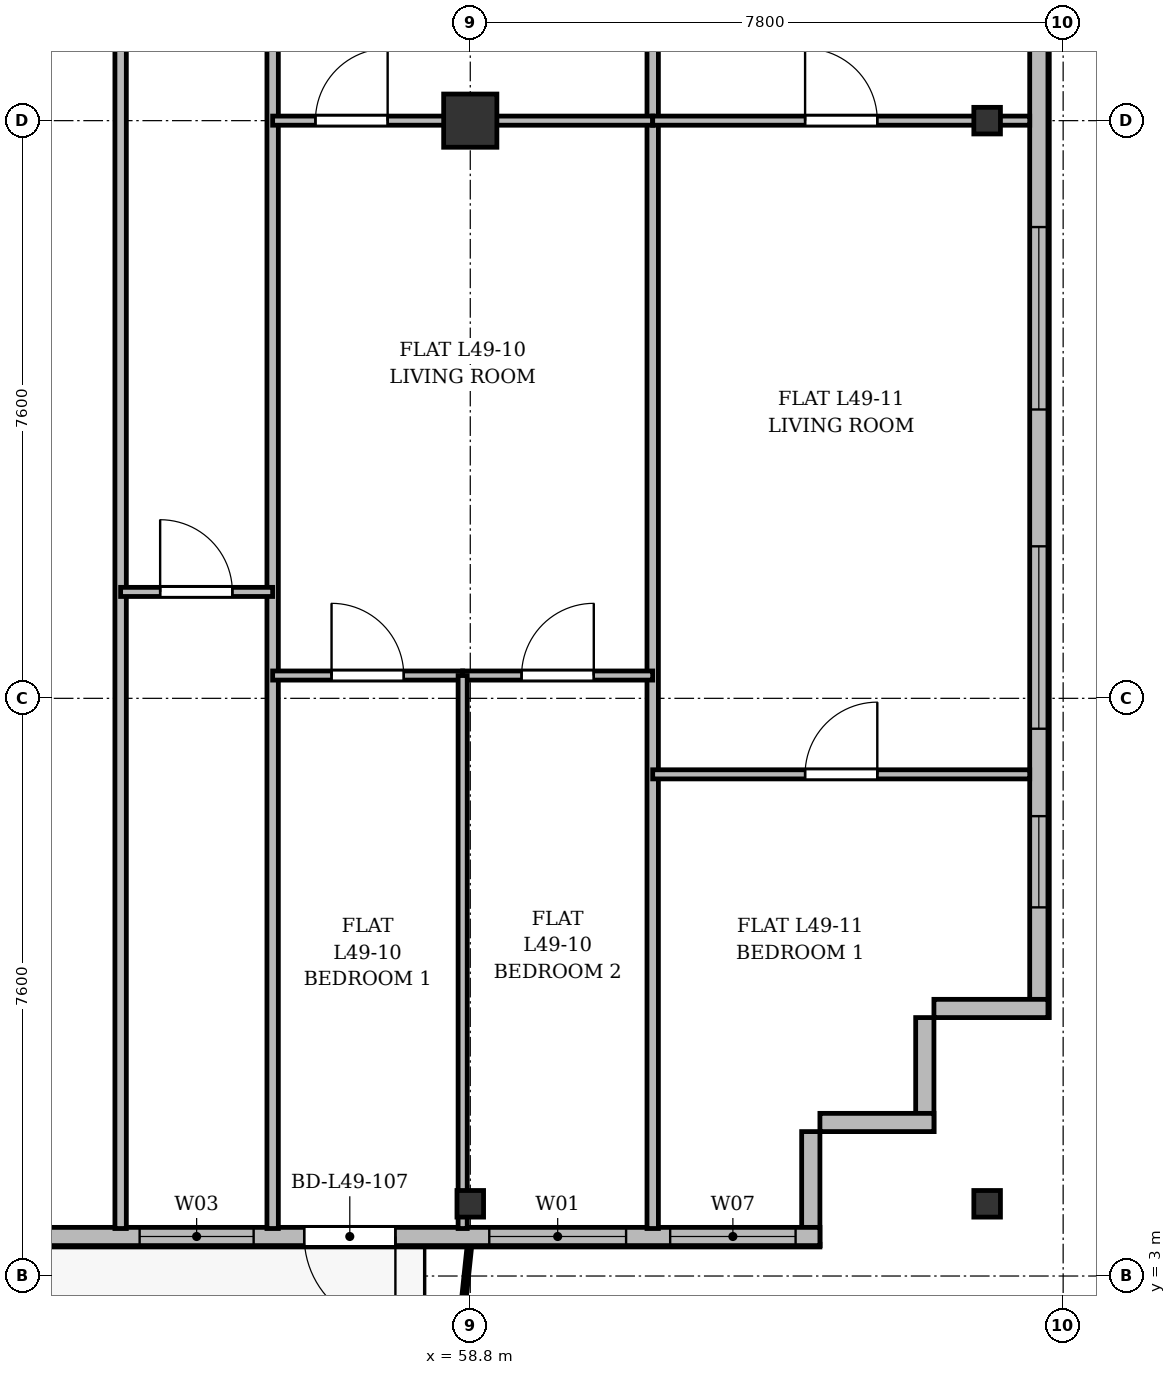
"""IFC4 building model, lengths in metres.
Left out: names, types, materials, properties, quantities, classifications, styles, units other than length and angle.
Written with IfcOpenShell. Run it as: python <this file> out.ifc"""

import sys

from ifc_helpers import new_model, si_unit, direction, frame, frame_2d, origin, origin_2d, place, context, subcontext, project, spatial, rectangle, i_section, extrude, source, transform, mapped, element, fill, save


model = new_model("IFC4")
c1 = context("Model", 3, precision=1e-05, world=origin(), true_north=direction((0.0, 1.0)))
c2 = subcontext(c1, "Body", "Model", "MODEL_VIEW")
j1 = project(units=[si_unit("LENGTHUNIT", "METRE"), si_unit("PLANEANGLEUNIT", "RADIAN")], contexts=[c1])
p1 = place(None, origin())
s1 = spatial("IfcSite", under=j1, at=p1, CompositionType="ELEMENT")
p2 = place(p1, origin())
s2 = spatial("IfcBuilding", under=s1, at=p2, CompositionType="ELEMENT")
p3 = place(p2, frame((0.0, 0.0, 190.5)))
s3 = spatial("IfcBuildingStorey", under=s2, at=p3, CompositionType="ELEMENT", Elevation=190.5)
m1 = source(origin(), c2, "Body", "SweptSolid", [
    extrude(i_section(OverallWidth=0.35, OverallDepth=0.35, WebThickness=0.018, FlangeThickness=0.028, at=origin_2d()), origin(), (0.0, 0.0, 1.0), 3.6),
])
p4 = place(p3, frame((58.8, 3.95, 0.0), z_axis=(0.0, 0.0, 1.0), x_axis=(1.0, 0.0, 0.0)))
e1 = element("IfcColumn", 1, at=p4, inside=s3, PredefinedType="COLUMN", context=c2, shape_type="MappedRepresentation", body=[
    mapped(m1, transform((0.0, 0.0, 0.0), x_axis=(1.0, 0.0, 0.0), y_axis=(0.0, 1.0, 0.0), z_axis=(0.0, 0.0, 1.0), scale=1.0)),
])
m2 = source(origin(), c2, "Body", "SweptSolid", [
    extrude(rectangle(XDim=0.7, YDim=0.7, at=origin_2d()), origin(), (0.0, 0.0, 1.0), 3.6),
])
p5 = place(p3, frame((58.8, 18.2, 0.0), z_axis=(0.0, 0.0, 1.0), x_axis=(1.0, 0.0, 0.0)))
e2 = element("IfcColumn", 2, at=p5, inside=s3, PredefinedType="COLUMN", context=c2, shape_type="MappedRepresentation", body=[
    mapped(m2, transform((0.0, 0.0, 0.0), x_axis=(1.0, 0.0, 0.0), y_axis=(0.0, 1.0, 0.0), z_axis=(0.0, 0.0, 1.0), scale=1.0)),
])
for number, where, z_axis, x_axis in (
    (3, (65.6, 3.95, 0.0), (0.0, 0.0, 1.0), (1.0, 0.0, 0.0)),
    (4, (65.6, 18.2, 0.0), (0.0, 0.0, 1.0), (1.0, 0.0, 0.0)),
):
    element("IfcColumn", number, at=place(p3, frame(where, z_axis=z_axis, x_axis=x_axis)), inside=s3, PredefinedType="COLUMN", context=c2, shape_type="MappedRepresentation", body=[
        mapped(m1, transform((0.0, 0.0, 0.0), x_axis=(1.0, 0.0, 0.0), y_axis=(0.0, 1.0, 0.0), z_axis=(0.0, 0.0, 1.0), scale=1.0)),
    ])
p6 = place(p3, frame((66.28, 45.5, 0.0), z_axis=(0.0, 0.0, 1.0), x_axis=(0.0, -1.0, 0.0)))
e5 = element("IfcWall", 5, at=p6, inside=s3, PredefinedType="SOLIDWALL", context=c2, shape_type="SweptSolid", body=[
    extrude(rectangle(XDim=39.1, YDim=0.24, at=frame_2d((19.55, 0.0))), origin(), (0.0, 0.0, 1.0), 3.36),
])
p7 = place(p6, frame((36.45, 0.0, 0.92)))
e6 = element("IfcOpeningElement", 6, at=p7, cuts=e5, PredefinedType="OPENING", context=c2, shape_type="SweptSolid", body=[
    extrude(rectangle(XDim=1.2, YDim=1.65, at=frame_2d((0.6, 0.825))), frame((0.0, 0.13, 0.0), z_axis=(0.0, -1.0, 0.0), x_axis=(1.0, 0.0, 0.0)), (0.0, 0.0, 1.0), 0.26),
])
p8 = place(p6, frame((32.9, 0.0, 0.92)))
e7 = element("IfcOpeningElement", 7, at=p8, cuts=e5, PredefinedType="OPENING", context=c2, shape_type="SweptSolid", body=[
    extrude(rectangle(XDim=2.4, YDim=2.1, at=frame_2d((1.2, 1.05))), frame((0.0, 0.13, 0.0), z_axis=(0.0, -1.0, 0.0), x_axis=(1.0, 0.0, 0.0)), (0.0, 0.0, 1.0), 0.26),
])
p9 = place(p6, frame((28.7, 0.0, 0.92)))
e8 = element("IfcOpeningElement", 8, at=p9, cuts=e5, PredefinedType="OPENING", context=c2, shape_type="SweptSolid", body=[
    extrude(rectangle(XDim=2.4, YDim=2.1, at=frame_2d((1.2, 1.05))), frame((0.0, 0.13, 0.0), z_axis=(0.0, -1.0, 0.0), x_axis=(1.0, 0.0, 0.0)), (0.0, 0.0, 1.0), 0.26),
])
p10 = place(p6, frame((21.5, 0.0, 0.92)))
e9 = element("IfcOpeningElement", 9, at=p10, cuts=e5, PredefinedType="OPENING", context=c2, shape_type="SweptSolid", body=[
    extrude(rectangle(XDim=2.4, YDim=2.1, at=frame_2d((1.2, 1.05))), frame((0.0, 0.13, 0.0), z_axis=(0.0, -1.0, 0.0), x_axis=(1.0, 0.0, 0.0)), (0.0, 0.0, 1.0), 0.26),
])
p11 = place(p6, frame((7.5, 0.0, 0.92)))
e10 = element("IfcOpeningElement", 10, at=p11, cuts=e5, PredefinedType="OPENING", context=c2, shape_type="SweptSolid", body=[
    extrude(rectangle(XDim=2.4, YDim=2.1, at=frame_2d((1.2, 1.05))), frame((0.0, 0.13, 0.0), z_axis=(0.0, -1.0, 0.0), x_axis=(1.0, 0.0, 0.0)), (0.0, 0.0, 1.0), 0.26),
])
p12 = place(p6, frame((4.5, 0.0, 0.92)))
e11 = element("IfcOpeningElement", 11, at=p12, cuts=e5, PredefinedType="OPENING", context=c2, shape_type="SweptSolid", body=[
    extrude(rectangle(XDim=1.2, YDim=1.65, at=frame_2d((0.6, 0.825))), frame((0.0, 0.13, 0.0), z_axis=(0.0, -1.0, 0.0), x_axis=(1.0, 0.0, 0.0)), (0.0, 0.0, 1.0), 0.26),
])
p13 = place(p6, frame((1.15, 0.0, 0.92)))
e12 = element("IfcOpeningElement", 12, at=p13, cuts=e5, PredefinedType="OPENING", context=c2, shape_type="SweptSolid", body=[
    extrude(rectangle(XDim=1.2, YDim=1.65, at=frame_2d((0.6, 0.825))), frame((0.0, 0.13, 0.0), z_axis=(0.0, -1.0, 0.0), x_axis=(1.0, 0.0, 0.0)), (0.0, 0.0, 1.0), 0.26),
])
p14 = place(p3, frame((66.4, 6.52, 0.0), z_axis=(0.0, 0.0, 1.0), x_axis=(-1.0, 0.0, 0.0)))
e13 = element("IfcWall", 13, at=p14, inside=s3, PredefinedType="SOLIDWALL", context=c2, shape_type="SweptSolid", body=[
    extrude(rectangle(XDim=1.5, YDim=0.24, at=frame_2d((0.75, 0.0))), origin(), (0.0, 0.0, 1.0), 2.86),
])
for number, where, z_axis, x_axis in (
    (14, (64.78, 6.4, 0.0), (0.0, 0.0, 1.0), (0.0, -1.0, 0.0)),
    (15, (64.9, 5.02, 0.0), (0.0, 0.0, 1.0), (-1.0, 0.0, 0.0)),
):
    element("IfcWall", number, at=place(p3, frame(where, z_axis=z_axis, x_axis=x_axis)), inside=s3, PredefinedType="SOLIDWALL", context=c2, shape_type="SweptSolid", body=[
        extrude(rectangle(XDim=1.5, YDim=0.24, at=frame_2d((0.75, 0.0))), origin(), (0.0, 0.0, 1.0), 3.36),
    ])
p15 = place(p3, frame((63.28, 4.9, 0.0), z_axis=(0.0, 0.0, 1.0), x_axis=(0.0, -1.0, 0.0)))
e16 = element("IfcWall", 16, at=p15, inside=s3, PredefinedType="SOLIDWALL", context=c2, shape_type="SweptSolid", body=[
    extrude(rectangle(XDim=1.5, YDim=0.24, at=frame_2d((0.75, 0.0))), origin(), (0.0, 0.0, 1.0), 2.91),
])
p16 = place(p3, frame((63.4, 3.52, 0.0), z_axis=(0.0, 0.0, 1.0), x_axis=(-1.0, 0.0, 0.0)))
e17 = element("IfcWall", 17, at=p16, inside=s3, PredefinedType="SOLIDWALL", context=c2, shape_type="SweptSolid", body=[
    extrude(rectangle(XDim=19.6, YDim=0.24, at=frame_2d((9.8, 0.0))), origin(), (0.0, 0.0, 1.0), 3.36),
])
p17 = place(p16, frame((0.32, 0.0, 0.9)))
e18 = element("IfcOpeningElement", 18, at=p17, cuts=e17, PredefinedType="OPENING", context=c2, shape_type="SweptSolid", body=[
    extrude(rectangle(XDim=1.65, YDim=1.85, at=frame_2d((0.825, 0.925))), frame((0.0, 0.13, 0.0), z_axis=(0.0, -1.0, 0.0), x_axis=(1.0, 0.0, 0.0)), (0.0, 0.0, 1.0), 0.26),
])
p18 = place(p16, frame((2.55, 0.0, 0.9)))
e19 = element("IfcOpeningElement", 19, at=p18, cuts=e17, PredefinedType="OPENING", context=c2, shape_type="SweptSolid", body=[
    extrude(rectangle(XDim=1.8, YDim=1.8, at=frame_2d((0.9, 0.9))), frame((0.0, 0.13, 0.0), z_axis=(0.0, -1.0, 0.0), x_axis=(1.0, 0.0, 0.0)), (0.0, 0.0, 1.0), 0.26),
])
p19 = place(p16, frame((5.585, 0.0, 0.0)))
e20 = element("IfcOpeningElement", 20, at=p19, cuts=e17, PredefinedType="OPENING", context=c2, shape_type="SweptSolid", body=[
    extrude(rectangle(XDim=1.2, YDim=2.2, at=frame_2d((0.6, 1.1))), frame((0.0, 0.13, 0.0), z_axis=(0.0, -1.0, 0.0), x_axis=(1.0, 0.0, 0.0)), (0.0, 0.0, 1.0), 0.26),
])
p20 = place(p16, frame((7.45, 0.0, 0.9)))
e21 = element("IfcOpeningElement", 21, at=p20, cuts=e17, PredefinedType="OPENING", context=c2, shape_type="SweptSolid", body=[
    extrude(rectangle(XDim=1.5, YDim=1.75, at=frame_2d((0.75, 0.875))), frame((0.0, 0.13, 0.0), z_axis=(0.0, -1.0, 0.0), x_axis=(1.0, 0.0, 0.0)), (0.0, 0.0, 1.0), 0.26),
])
p21 = place(p16, frame((10.7, 0.0, 0.9)))
e22 = element("IfcOpeningElement", 22, at=p21, cuts=e17, PredefinedType="OPENING", context=c2, shape_type="SweptSolid", body=[
    extrude(rectangle(XDim=2.0, YDim=1.95, at=frame_2d((1.0, 0.975))), frame((0.0, 0.13, 0.0), z_axis=(0.0, -1.0, 0.0), x_axis=(1.0, 0.0, 0.0)), (0.0, 0.0, 1.0), 0.26),
])
p22 = place(p16, frame((16.03, 0.0, 0.9)))
e23 = element("IfcOpeningElement", 23, at=p22, cuts=e17, PredefinedType="OPENING", context=c2, shape_type="SweptSolid", body=[
    extrude(rectangle(XDim=1.65, YDim=1.85, at=frame_2d((0.825, 0.925))), frame((0.0, 0.13, 0.0), z_axis=(0.0, -1.0, 0.0), x_axis=(1.0, 0.0, 0.0)), (0.0, 0.0, 1.0), 0.26),
])
for number, where, z_axis, x_axis in (
    (24, (61.2, 3.625, 0.0), (0.0, 0.0, 1.0), (0.0, 1.0, 0.0)),
    (25, (54.2, 3.625, 0.0), (0.0, 0.0, 1.0), (0.0, 1.0, 0.0)),
    (26, (56.2, 3.625, 0.0), (0.0, 0.0, 1.0), (0.0, 1.0, 0.0)),
):
    element("IfcWall", number, at=place(p3, frame(where, z_axis=z_axis, x_axis=x_axis)), inside=s3, PredefinedType="PARTITIONING", context=c2, shape_type="SweptSolid", body=[
        extrude(rectangle(XDim=27.175, YDim=0.15, at=frame_2d((13.587, 0.0))), origin(), (0.0, 0.0, 1.0), 2.91),
    ])
p23 = place(p3, frame((54.2, 12.0, 0.0), z_axis=(0.0, 0.0, 1.0), x_axis=(1.0, 0.0, 0.0)))
e27 = element("IfcWall", 27, at=p23, inside=s3, PredefinedType="PARTITIONING", context=c2, shape_type="SweptSolid", body=[
    extrude(rectangle(XDim=2.0, YDim=0.12, at=frame_2d((1.0, 0.0))), origin(), (0.0, 0.0, 1.0), 3.36),
])
p24 = place(p23, frame((0.52, 0.0, 0.0)))
e28 = element("IfcOpeningElement", 28, at=p24, cuts=e27, PredefinedType="OPENING", context=c2, shape_type="SweptSolid", body=[
    extrude(rectangle(XDim=0.95, YDim=2.15, at=frame_2d((0.475, 1.075))), frame((0.0, 0.07, 0.0), z_axis=(0.0, -1.0, 0.0), x_axis=(1.0, 0.0, 0.0)), (0.0, 0.0, 1.0), 0.14),
])
p25 = place(p3, frame((56.2, 18.2, 0.0), z_axis=(0.0, 0.0, 1.0), x_axis=(1.0, 0.0, 0.0)))
e29 = element("IfcWall", 29, at=p25, inside=s3, PredefinedType="PARTITIONING", context=c2, shape_type="SweptSolid", body=[
    extrude(rectangle(XDim=5.0, YDim=0.12, at=frame_2d((2.5, 0.0))), origin(), (0.0, 0.0, 1.0), 2.91),
])
p26 = place(p25, frame((0.563, 0.0, 0.0)))
e30 = element("IfcOpeningElement", 30, at=p26, cuts=e29, PredefinedType="OPENING", context=c2, shape_type="SweptSolid", body=[
    extrude(rectangle(XDim=0.95, YDim=2.15, at=frame_2d((0.475, 1.075))), frame((0.0, 0.07, 0.0), z_axis=(0.0, -1.0, 0.0), x_axis=(1.0, 0.0, 0.0)), (0.0, 0.0, 1.0), 0.14),
])
p27 = place(p3, frame((56.2, 10.9, 0.0), z_axis=(0.0, 0.0, 1.0), x_axis=(1.0, 0.0, 0.0)))
e31 = element("IfcWall", 31, at=p27, inside=s3, PredefinedType="PARTITIONING", context=c2, shape_type="SweptSolid", body=[
    extrude(rectangle(XDim=2.5, YDim=0.12, at=frame_2d((1.25, 0.0))), origin(), (0.0, 0.0, 1.0), 3.36),
])
p28 = place(p27, frame((0.775, 0.0, 0.0)))
e32 = element("IfcOpeningElement", 32, at=p28, cuts=e31, PredefinedType="OPENING", context=c2, shape_type="SweptSolid", body=[
    extrude(rectangle(XDim=0.95, YDim=2.15, at=frame_2d((0.475, 1.075))), frame((0.0, 0.07, 0.0), z_axis=(0.0, -1.0, 0.0), x_axis=(1.0, 0.0, 0.0)), (0.0, 0.0, 1.0), 0.14),
])
p29 = place(p3, frame((58.7, 10.9, 0.0), z_axis=(0.0, 0.0, 1.0), x_axis=(1.0, 0.0, 0.0)))
e33 = element("IfcWall", 33, at=p29, inside=s3, PredefinedType="PARTITIONING", context=c2, shape_type="SweptSolid", body=[
    extrude(rectangle(XDim=2.5, YDim=0.12, at=frame_2d((1.25, 0.0))), origin(), (0.0, 0.0, 1.0), 2.86),
])
p30 = place(p29, frame((0.775, 0.0, 0.0)))
e34 = element("IfcOpeningElement", 34, at=p30, cuts=e33, PredefinedType="OPENING", context=c2, shape_type="SweptSolid", body=[
    extrude(rectangle(XDim=0.95, YDim=2.15, at=frame_2d((0.475, 1.075))), frame((0.0, 0.07, 0.0), z_axis=(0.0, -1.0, 0.0), x_axis=(1.0, 0.0, 0.0)), (0.0, 0.0, 1.0), 0.14),
])
p31 = place(p3, frame((58.7, 3.625, 0.0), z_axis=(0.0, 0.0, 1.0), x_axis=(0.0, 1.0, 0.0)))
e35 = element("IfcWall", 35, at=p31, inside=s3, PredefinedType="PARTITIONING", context=c2, shape_type="SweptSolid", body=[
    extrude(rectangle(XDim=7.275, YDim=0.12, at=frame_2d((3.637, 0.0))), origin(), (0.0, 0.0, 1.0), 2.86),
])
p32 = place(p3, frame((61.2, 18.2, 0.0), z_axis=(0.0, 0.0, 1.0), x_axis=(1.0, 0.0, 0.0)))
e36 = element("IfcWall", 36, at=p32, inside=s3, PredefinedType="PARTITIONING", context=c2, shape_type="SweptSolid", body=[
    extrude(rectangle(XDim=4.96, YDim=0.12, at=frame_2d((2.48, 0.0))), origin(), (0.0, 0.0, 1.0), 2.91),
])
p33 = place(p32, frame((2.005, 0.0, 0.0)))
e37 = element("IfcOpeningElement", 37, at=p33, cuts=e36, PredefinedType="OPENING", context=c2, shape_type="SweptSolid", body=[
    extrude(rectangle(XDim=0.95, YDim=2.15, at=frame_2d((0.475, 1.075))), frame((0.0, 0.07, 0.0), z_axis=(0.0, -1.0, 0.0), x_axis=(1.0, 0.0, 0.0)), (0.0, 0.0, 1.0), 0.14),
])
p34 = place(p3, frame((61.2, 9.6, 0.0), z_axis=(0.0, 0.0, 1.0), x_axis=(1.0, 0.0, 0.0)))
e38 = element("IfcWall", 38, at=p34, inside=s3, PredefinedType="PARTITIONING", context=c2, shape_type="SweptSolid", body=[
    extrude(rectangle(XDim=4.96, YDim=0.12, at=frame_2d((2.48, 0.0))), origin(), (0.0, 0.0, 1.0), 2.86),
])
p35 = place(p34, frame((2.005, 0.0, 0.0)))
e39 = element("IfcOpeningElement", 39, at=p35, cuts=e38, PredefinedType="OPENING", context=c2, shape_type="SweptSolid", body=[
    extrude(rectangle(XDim=0.95, YDim=2.15, at=frame_2d((0.475, 1.075))), frame((0.0, 0.07, 0.0), z_axis=(0.0, -1.0, 0.0), x_axis=(1.0, 0.0, 0.0)), (0.0, 0.0, 1.0), 0.14),
])
m3 = source(origin(), c2, "Body", "SweptSolid", [
    extrude(rectangle(XDim=1.2, YDim=1.65, at=frame_2d((0.6, 0.825))), frame((0.0, 0.03, 0.0), z_axis=(0.0, -1.0, 0.0), x_axis=(1.0, 0.0, 0.0)), (0.0, 0.0, 1.0), 0.06),
])
p36 = place(p7, origin())
e40 = element("IfcWindow", 40, at=p36, inside=s3, PartitioningType="SINGLE_PANEL", PredefinedType="WINDOW", context=c2, shape_type="MappedRepresentation", body=[
    mapped(m3, transform((0.0, 0.0, 0.0), x_axis=(1.0, 0.0, 0.0), y_axis=(0.0, 1.0, 0.0), z_axis=(0.0, 0.0, 1.0), scale=1.0)),
])
fill(e6, e40)
m4 = source(origin(), c2, "Body", "SweptSolid", [
    extrude(rectangle(XDim=2.4, YDim=2.1, at=frame_2d((1.2, 1.05))), frame((0.0, 0.03, 0.0), z_axis=(0.0, -1.0, 0.0), x_axis=(1.0, 0.0, 0.0)), (0.0, 0.0, 1.0), 0.06),
])
p37 = place(p8, origin())
e41 = element("IfcWindow", 41, at=p37, inside=s3, PartitioningType="SINGLE_PANEL", PredefinedType="WINDOW", context=c2, shape_type="MappedRepresentation", body=[
    mapped(m4, transform((0.0, 0.0, 0.0), x_axis=(1.0, 0.0, 0.0), y_axis=(0.0, 1.0, 0.0), z_axis=(0.0, 0.0, 1.0), scale=1.0)),
])
fill(e7, e41)
p38 = place(p9, origin())
e42 = element("IfcWindow", 42, at=p38, inside=s3, PartitioningType="SINGLE_PANEL", PredefinedType="WINDOW", context=c2, shape_type="MappedRepresentation", body=[
    mapped(m4, transform((0.0, 0.0, 0.0), x_axis=(1.0, 0.0, 0.0), y_axis=(0.0, 1.0, 0.0), z_axis=(0.0, 0.0, 1.0), scale=1.0)),
])
fill(e8, e42)
m5 = source(origin(), c2, "Body", "SweptSolid", [
    extrude(rectangle(XDim=1.65, YDim=1.85, at=frame_2d((0.825, 0.925))), frame((0.0, 0.03, 0.0), z_axis=(0.0, -1.0, 0.0), x_axis=(1.0, 0.0, 0.0)), (0.0, 0.0, 1.0), 0.06),
])
p39 = place(p17, origin())
e43 = element("IfcWindow", 43, at=p39, inside=s3, PartitioningType="SINGLE_PANEL", PredefinedType="WINDOW", context=c2, shape_type="MappedRepresentation", body=[
    mapped(m5, transform((0.0, 0.0, 0.0), x_axis=(1.0, 0.0, 0.0), y_axis=(0.0, 1.0, 0.0), z_axis=(0.0, 0.0, 1.0), scale=1.0)),
])
fill(e18, e43)
m6 = source(origin(), c2, "Body", "SweptSolid", [
    extrude(rectangle(XDim=1.8, YDim=1.8, at=frame_2d((0.9, 0.9))), frame((0.0, 0.03, 0.0), z_axis=(0.0, -1.0, 0.0), x_axis=(1.0, 0.0, 0.0)), (0.0, 0.0, 1.0), 0.06),
])
p40 = place(p18, origin())
e44 = element("IfcWindow", 44, at=p40, inside=s3, PartitioningType="SINGLE_PANEL", PredefinedType="WINDOW", context=c2, shape_type="MappedRepresentation", body=[
    mapped(m6, transform((0.0, 0.0, 0.0), x_axis=(1.0, 0.0, 0.0), y_axis=(0.0, 1.0, 0.0), z_axis=(0.0, 0.0, 1.0), scale=1.0)),
])
fill(e19, e44)
m7 = source(origin(), c2, "Body", "SweptSolid", [
    extrude(rectangle(XDim=1.2, YDim=2.2, at=frame_2d((0.6, 1.1))), frame((0.0, 0.025, 0.0), z_axis=(0.0, -1.0, 0.0), x_axis=(1.0, 0.0, 0.0)), (0.0, 0.0, 1.0), 0.05),
])
p41 = place(p19, origin())
e45 = element("IfcDoor", 45, at=p41, inside=s3, OperationType="SINGLE_SWING_LEFT", PredefinedType="DOOR", context=c2, shape_type="MappedRepresentation", body=[
    mapped(m7, transform((0.0, 0.0, 0.0), x_axis=(1.0, 0.0, 0.0), y_axis=(0.0, 1.0, 0.0), z_axis=(0.0, 0.0, 1.0), scale=1.0)),
])
fill(e20, e45)
m8 = source(origin(), c2, "Body", "SweptSolid", [
    extrude(rectangle(XDim=1.5, YDim=1.75, at=frame_2d((0.75, 0.875))), frame((0.0, 0.03, 0.0), z_axis=(0.0, -1.0, 0.0), x_axis=(1.0, 0.0, 0.0)), (0.0, 0.0, 1.0), 0.06),
])
p42 = place(p20, origin())
e46 = element("IfcWindow", 46, at=p42, inside=s3, PartitioningType="SINGLE_PANEL", PredefinedType="WINDOW", context=c2, shape_type="MappedRepresentation", body=[
    mapped(m8, transform((0.0, 0.0, 0.0), x_axis=(1.0, 0.0, 0.0), y_axis=(0.0, 1.0, 0.0), z_axis=(0.0, 0.0, 1.0), scale=1.0)),
])
fill(e21, e46)
m9 = source(origin(), c2, "Body", "SweptSolid", [
    extrude(rectangle(XDim=0.95, YDim=2.15, at=frame_2d((0.475, 1.075))), frame((0.0, 0.025, 0.0), z_axis=(0.0, -1.0, 0.0), x_axis=(1.0, 0.0, 0.0)), (0.0, 0.0, 1.0), 0.05),
])
p43 = place(p24, origin())
e47 = element("IfcDoor", 47, at=p43, inside=s3, OperationType="SINGLE_SWING_LEFT", PredefinedType="DOOR", context=c2, shape_type="MappedRepresentation", body=[
    mapped(m9, transform((0.0, 0.0, 0.0), x_axis=(1.0, 0.0, 0.0), y_axis=(0.0, 1.0, 0.0), z_axis=(0.0, 0.0, 1.0), scale=1.0)),
])
fill(e28, e47)
p44 = place(p26, origin())
e48 = element("IfcDoor", 48, at=p44, inside=s3, OperationType="SINGLE_SWING_RIGHT", PredefinedType="DOOR", context=c2, shape_type="MappedRepresentation", body=[
    mapped(m9, transform((0.0, 0.0, 0.0), x_axis=(1.0, 0.0, 0.0), y_axis=(0.0, 1.0, 0.0), z_axis=(0.0, 0.0, 1.0), scale=1.0)),
])
fill(e30, e48)
p45 = place(p28, origin())
e49 = element("IfcDoor", 49, at=p45, inside=s3, OperationType="SINGLE_SWING_LEFT", PredefinedType="DOOR", context=c2, shape_type="MappedRepresentation", body=[
    mapped(m9, transform((0.0, 0.0, 0.0), x_axis=(1.0, 0.0, 0.0), y_axis=(0.0, 1.0, 0.0), z_axis=(0.0, 0.0, 1.0), scale=1.0)),
])
fill(e32, e49)
p46 = place(p30, origin())
e50 = element("IfcDoor", 50, at=p46, inside=s3, OperationType="SINGLE_SWING_RIGHT", PredefinedType="DOOR", context=c2, shape_type="MappedRepresentation", body=[
    mapped(m9, transform((0.0, 0.0, 0.0), x_axis=(1.0, 0.0, 0.0), y_axis=(0.0, 1.0, 0.0), z_axis=(0.0, 0.0, 1.0), scale=1.0)),
])
fill(e34, e50)
p47 = place(p33, origin())
e51 = element("IfcDoor", 51, at=p47, inside=s3, OperationType="SINGLE_SWING_LEFT", PredefinedType="DOOR", context=c2, shape_type="MappedRepresentation", body=[
    mapped(m9, transform((0.0, 0.0, 0.0), x_axis=(1.0, 0.0, 0.0), y_axis=(0.0, 1.0, 0.0), z_axis=(0.0, 0.0, 1.0), scale=1.0)),
])
fill(e37, e51)
p48 = place(p35, origin())
e52 = element("IfcDoor", 52, at=p48, inside=s3, OperationType="SINGLE_SWING_RIGHT", PredefinedType="DOOR", context=c2, shape_type="MappedRepresentation", body=[
    mapped(m9, transform((0.0, 0.0, 0.0), x_axis=(1.0, 0.0, 0.0), y_axis=(0.0, 1.0, 0.0), z_axis=(0.0, 0.0, 1.0), scale=1.0)),
])
fill(e39, e52)
save(model, sys.argv[1])
